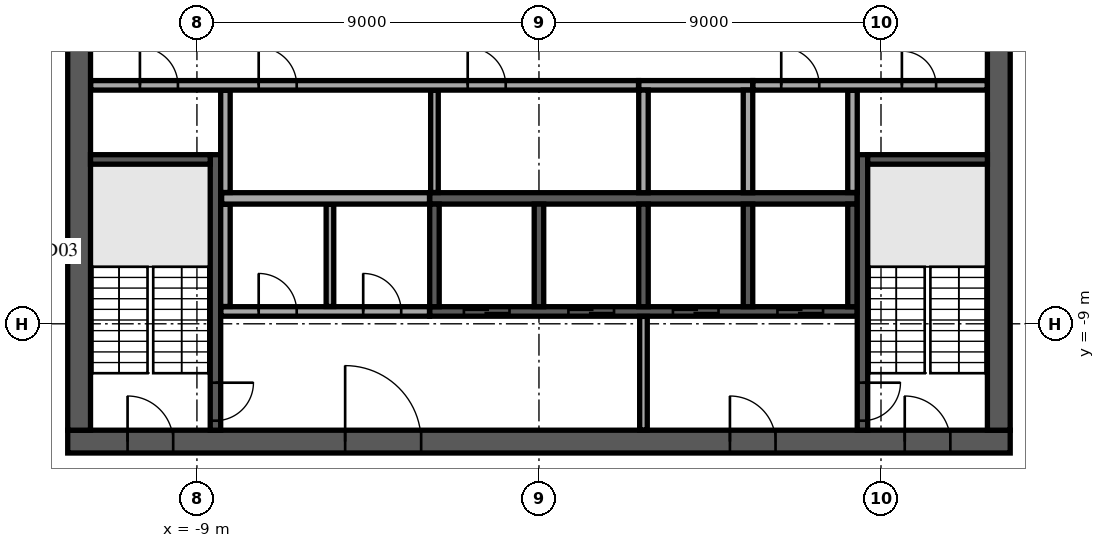
"""IFC4 building model, lengths in metres.
Left out: names, types, materials, properties, quantities, classifications, styles, units other than length and angle.
Written with IfcOpenShell. Run it as: python <this file> out.ifc"""

import sys

from ifc_helpers import new_model, si_unit, direction, frame, frame_2d, origin, place, context, subcontext, project, spatial, rectangle, extrude, element, fill, save


model = new_model("IFC4")
c1 = context("Model", 3, precision=1e-05, world=origin(), true_north=direction((0.0, 1.0)))
c2 = subcontext(c1, "Body", "Model", "MODEL_VIEW")
j1 = project(units=[si_unit("LENGTHUNIT", "METRE"), si_unit("PLANEANGLEUNIT", "RADIAN")], contexts=[c1])
p1 = place(None, origin())
s1 = spatial("IfcSite", under=j1, at=p1, CompositionType="ELEMENT")
p2 = place(p1, origin())
s2 = spatial("IfcBuilding", under=s1, at=p2, CompositionType="ELEMENT")
p3 = place(p2, frame((0.0, 0.0, 324.5)))
s3 = spatial("IfcBuildingStorey", under=s2, at=p3, CompositionType="ELEMENT", Elevation=324.5)
p4 = place(p3, frame((-12.4, -12.1, 0.0), z_axis=(0.0, 0.0, 1.0), x_axis=(1.0, 0.0, 0.0)))
e1 = element("IfcWall", 1, at=p4, inside=s3, PredefinedType="SHEAR", context=c2, shape_type="SweptSolid", body=[
    extrude(rectangle(XDim=24.8, YDim=0.6, at=frame_2d((12.4, 0.0))), origin(), (0.0, 0.0, 1.0), 3.65),
])
p5 = place(p4, frame((7.3, 0.0, 0.0)))
e2 = element("IfcOpeningElement", 2, at=p5, cuts=e1, PredefinedType="OPENING", context=c2, shape_type="SweptSolid", body=[
    extrude(rectangle(XDim=2.0, YDim=2.1, at=frame_2d((1.0, 1.05))), frame((0.0, 0.31, 0.0), z_axis=(0.0, -1.0, 0.0), x_axis=(1.0, 0.0, 0.0)), (0.0, 0.0, 1.0), 0.62),
])
p6 = place(p4, frame((17.425, 0.0, 0.0)))
e3 = element("IfcOpeningElement", 3, at=p6, cuts=e1, PredefinedType="OPENING", context=c2, shape_type="SweptSolid", body=[
    extrude(rectangle(XDim=1.2, YDim=2.1, at=frame_2d((0.6, 1.05))), frame((0.0, 0.31, 0.0), z_axis=(0.0, -1.0, 0.0), x_axis=(1.0, 0.0, 0.0)), (0.0, 0.0, 1.0), 0.62),
])
p7 = place(p4, frame((1.575, 0.0, 0.0)))
e4 = element("IfcOpeningElement", 4, at=p7, cuts=e1, PredefinedType="OPENING", context=c2, shape_type="SweptSolid", body=[
    extrude(rectangle(XDim=1.2, YDim=2.1, at=frame_2d((0.6, 1.05))), frame((0.0, 0.31, 0.0), z_axis=(0.0, -1.0, 0.0), x_axis=(1.0, 0.0, 0.0)), (0.0, 0.0, 1.0), 0.62),
])
p8 = place(p4, frame((22.025, 0.0, 0.0)))
e5 = element("IfcOpeningElement", 5, at=p8, cuts=e1, PredefinedType="OPENING", context=c2, shape_type="SweptSolid", body=[
    extrude(rectangle(XDim=1.2, YDim=2.1, at=frame_2d((0.6, 1.05))), frame((0.0, 0.31, 0.0), z_axis=(0.0, -1.0, 0.0), x_axis=(1.0, 0.0, 0.0)), (0.0, 0.0, 1.0), 0.62),
])
p9 = place(p3, frame((12.1, -11.8, 0.0), z_axis=(0.0, 0.0, 1.0), x_axis=(0.0, 1.0, 0.0)))
e6 = element("IfcWall", 6, at=p9, inside=s3, PredefinedType="SHEAR", context=c2, shape_type="SweptSolid", body=[
    extrude(rectangle(XDim=23.6, YDim=0.6, at=frame_2d((11.8, 0.0))), origin(), (0.0, 0.0, 1.0), 3.65),
])
p10 = place(p9, frame((10.6, 0.0, 0.0)))
e7 = element("IfcOpeningElement", 7, at=p10, cuts=e6, PredefinedType="OPENING", context=c2, shape_type="SweptSolid", body=[
    extrude(rectangle(XDim=2.4, YDim=2.4, at=frame_2d((1.2, 1.2))), frame((0.0, 0.31, 0.0), z_axis=(0.0, -1.0, 0.0), x_axis=(1.0, 0.0, 0.0)), (0.0, 0.0, 1.0), 0.62),
])
p11 = place(p3, frame((-12.1, -11.8, 0.0), z_axis=(0.0, 0.0, 1.0), x_axis=(0.0, 1.0, 0.0)))
e8 = element("IfcWall", 8, at=p11, inside=s3, PredefinedType="SHEAR", context=c2, shape_type="SweptSolid", body=[
    extrude(rectangle(XDim=23.6, YDim=0.6, at=frame_2d((11.8, 0.0))), origin(), (0.0, 0.0, 1.0), 3.65),
])
p12 = place(p11, frame((10.6, 0.0, 0.0)))
e9 = element("IfcOpeningElement", 9, at=p12, cuts=e8, PredefinedType="OPENING", context=c2, shape_type="SweptSolid", body=[
    extrude(rectangle(XDim=2.4, YDim=2.4, at=frame_2d((1.2, 1.2))), frame((0.0, 0.31, 0.0), z_axis=(0.0, -1.0, 0.0), x_axis=(1.0, 0.0, 0.0)), (0.0, 0.0, 1.0), 0.62),
])
p13 = place(p3, frame((-2.875, -5.7, 0.0), z_axis=(0.0, 0.0, 1.0), x_axis=(1.0, 0.0, 0.0)))
e10 = element("IfcWall", 10, at=p13, inside=s3, PredefinedType="SOLIDWALL", context=c2, shape_type="SweptSolid", body=[
    extrude(rectangle(XDim=11.25, YDim=0.3, at=frame_2d((5.625, 0.0))), origin(), (0.0, 0.0, 1.0), 3.65),
])
p14 = place(p3, frame((2.625, -2.725, 0.0), z_axis=(0.0, 0.0, 1.0), x_axis=(1.0, 0.0, 0.0)))
e11 = element("IfcWall", 11, at=p14, inside=s3, PredefinedType="SOLIDWALL", context=c2, shape_type="SweptSolid", body=[
    extrude(rectangle(XDim=3.0, YDim=0.25, at=frame_2d((1.5, 0.0))), origin(), (0.0, 0.0, 1.0), 3.65),
])
for number, where, z_axis, x_axis in (
    (12, (2.75, -5.55, 0.0), (0.0, 0.0, 1.0), (0.0, 1.0, 0.0)),
    (13, (5.5, -5.55, 0.0), (0.0, 0.0, 1.0), (0.0, 1.0, 0.0)),
):
    element("IfcWall", number, at=place(p3, frame(where, z_axis=z_axis, x_axis=x_axis)), inside=s3, PredefinedType="SOLIDWALL", context=c2, shape_type="SweptSolid", body=[
        extrude(rectangle(XDim=2.7, YDim=0.25, at=frame_2d((1.35, 0.0))), origin(), (0.0, 0.0, 1.0), 3.65),
    ])
p15 = place(p3, frame((-2.875, -8.675, 0.0), z_axis=(0.0, 0.0, 1.0), x_axis=(1.0, 0.0, 0.0)))
e14 = element("IfcWall", 14, at=p15, inside=s3, PredefinedType="SOLIDWALL", context=c2, shape_type="SweptSolid", body=[
    extrude(rectangle(XDim=11.25, YDim=0.25, at=frame_2d((5.625, 0.0))), origin(), (0.0, 0.0, 1.0), 3.65),
])
p16 = place(p15, frame((0.9, 0.0, 0.0)))
e15 = element("IfcOpeningElement", 15, at=p16, cuts=e14, PredefinedType="OPENING", context=c2, shape_type="SweptSolid", body=[
    extrude(rectangle(XDim=1.2, YDim=2.1, at=frame_2d((0.6, 1.05))), frame((0.0, 0.135, 0.0), z_axis=(0.0, -1.0, 0.0), x_axis=(1.0, 0.0, 0.0)), (0.0, 0.0, 1.0), 0.27),
])
p17 = place(p15, frame((3.65, 0.0, 0.0)))
e16 = element("IfcOpeningElement", 16, at=p17, cuts=e14, PredefinedType="OPENING", context=c2, shape_type="SweptSolid", body=[
    extrude(rectangle(XDim=1.2, YDim=2.1, at=frame_2d((0.6, 1.05))), frame((0.0, 0.135, 0.0), z_axis=(0.0, -1.0, 0.0), x_axis=(1.0, 0.0, 0.0)), (0.0, 0.0, 1.0), 0.27),
])
p18 = place(p15, frame((6.4, 0.0, 0.0)))
e17 = element("IfcOpeningElement", 17, at=p18, cuts=e14, PredefinedType="OPENING", context=c2, shape_type="SweptSolid", body=[
    extrude(rectangle(XDim=1.2, YDim=2.1, at=frame_2d((0.6, 1.05))), frame((0.0, 0.135, 0.0), z_axis=(0.0, -1.0, 0.0), x_axis=(1.0, 0.0, 0.0)), (0.0, 0.0, 1.0), 0.27),
])
p19 = place(p15, frame((9.15, 0.0, 0.0)))
e18 = element("IfcOpeningElement", 18, at=p19, cuts=e14, PredefinedType="OPENING", context=c2, shape_type="SweptSolid", body=[
    extrude(rectangle(XDim=1.2, YDim=2.1, at=frame_2d((0.6, 1.05))), frame((0.0, 0.135, 0.0), z_axis=(0.0, -1.0, 0.0), x_axis=(1.0, 0.0, 0.0)), (0.0, 0.0, 1.0), 0.27),
])
for number, where, z_axis, x_axis in (
    (19, (-2.75, -8.55, 0.0), (0.0, 0.0, 1.0), (0.0, 1.0, 0.0)),
    (20, (0.0, -8.55, 0.0), (0.0, 0.0, 1.0), (0.0, 1.0, 0.0)),
    (21, (2.75, -8.55, 0.0), (0.0, 0.0, 1.0), (0.0, 1.0, 0.0)),
    (22, (5.5, -8.55, 0.0), (0.0, 0.0, 1.0), (0.0, 1.0, 0.0)),
    (23, (8.25, -8.55, 0.0), (0.0, 0.0, 1.0), (0.0, 1.0, 0.0)),
):
    element("IfcWall", number, at=place(p3, frame(where, z_axis=z_axis, x_axis=x_axis)), inside=s3, PredefinedType="SOLIDWALL", context=c2, shape_type="SweptSolid", body=[
        extrude(rectangle(XDim=2.7, YDim=0.25, at=frame_2d((1.35, 0.0))), origin(), (0.0, 0.0, 1.0), 3.65),
    ])
p20 = place(p3, frame((-8.512, -4.55, 0.0), z_axis=(0.0, 0.0, 1.0), x_axis=(0.0, -1.0, 0.0)))
e24 = element("IfcWall", 24, at=p20, inside=s3, PredefinedType="SOLIDWALL", context=c2, shape_type="SweptSolid", body=[
    extrude(rectangle(XDim=7.25, YDim=0.275, at=frame_2d((3.625, 0.0))), origin(), (0.0, 0.0, 1.0), 3.65),
])
p21 = place(p20, frame((6.0, 0.0, 0.0)))
e25 = element("IfcOpeningElement", 25, at=p21, cuts=e24, PredefinedType="OPENING", context=c2, shape_type="SweptSolid", body=[
    extrude(rectangle(XDim=1.0, YDim=2.1, at=frame_2d((0.5, 1.05))), frame((0.0, 0.147, 0.0), z_axis=(0.0, -1.0, 0.0), x_axis=(1.0, 0.0, 0.0)), (0.0, 0.0, 1.0), 0.295),
])
p22 = place(p3, frame((-8.65, -4.675, 0.0), z_axis=(0.0, 0.0, 1.0), x_axis=(-1.0, 0.0, 0.0)))
e26 = element("IfcWall", 26, at=p22, inside=s3, PredefinedType="SOLIDWALL", context=c2, shape_type="SweptSolid", body=[
    extrude(rectangle(XDim=3.15, YDim=0.25, at=frame_2d((1.575, 0.0))), origin(), (0.0, 0.0, 1.0), 3.65),
])
p23 = place(p3, frame((8.512, -4.55, 0.0), z_axis=(0.0, 0.0, 1.0), x_axis=(0.0, -1.0, 0.0)))
e27 = element("IfcWall", 27, at=p23, inside=s3, PredefinedType="SOLIDWALL", context=c2, shape_type="SweptSolid", body=[
    extrude(rectangle(XDim=7.25, YDim=0.275, at=frame_2d((3.625, 0.0))), origin(), (0.0, 0.0, 1.0), 3.65),
])
p24 = place(p23, frame((6.0, 0.0, 0.0)))
e28 = element("IfcOpeningElement", 28, at=p24, cuts=e27, PredefinedType="OPENING", context=c2, shape_type="SweptSolid", body=[
    extrude(rectangle(XDim=1.0, YDim=2.1, at=frame_2d((0.5, 1.05))), frame((0.0, 0.147, 0.0), z_axis=(0.0, -1.0, 0.0), x_axis=(1.0, 0.0, 0.0)), (0.0, 0.0, 1.0), 0.295),
])
p25 = place(p3, frame((8.65, -4.675, 0.0), z_axis=(0.0, 0.0, 1.0), x_axis=(1.0, 0.0, 0.0)))
e29 = element("IfcWall", 29, at=p25, inside=s3, PredefinedType="SOLIDWALL", context=c2, shape_type="SweptSolid", body=[
    extrude(rectangle(XDim=3.15, YDim=0.25, at=frame_2d((1.575, 0.0))), origin(), (0.0, 0.0, 1.0), 3.65),
])
p26 = place(p3, frame((2.75, -11.795, 0.0), z_axis=(0.0, 0.0, 1.0), x_axis=(0.0, 1.0, 0.0)))
e30 = element("IfcWall", 30, at=p26, inside=s3, PredefinedType="PARTITIONING", context=c2, shape_type="SweptSolid", body=[
    extrude(rectangle(XDim=2.99, YDim=0.2, at=frame_2d((1.495, 0.0))), origin(), (0.0, 0.0, 1.0), 3.65),
])
p27 = place(p3, frame((-8.37, -8.675, 0.0), z_axis=(0.0, 0.0, 1.0), x_axis=(1.0, 0.0, 0.0)))
e31 = element("IfcWall", 31, at=p27, inside=s3, PredefinedType="PARTITIONING", context=c2, shape_type="SweptSolid", body=[
    extrude(rectangle(XDim=5.49, YDim=0.25, at=frame_2d((2.745, 0.0))), origin(), (0.0, 0.0, 1.0), 3.65),
])
p28 = place(p27, frame((0.995, 0.0, 0.0)))
e32 = element("IfcOpeningElement", 32, at=p28, cuts=e31, PredefinedType="OPENING", context=c2, shape_type="SweptSolid", body=[
    extrude(rectangle(XDim=1.0, YDim=2.1, at=frame_2d((0.5, 1.05))), frame((0.0, 0.135, 0.0), z_axis=(0.0, -1.0, 0.0), x_axis=(1.0, 0.0, 0.0)), (0.0, 0.0, 1.0), 0.27),
])
p29 = place(p27, frame((3.745, 0.0, 0.0)))
e33 = element("IfcOpeningElement", 33, at=p29, cuts=e31, PredefinedType="OPENING", context=c2, shape_type="SweptSolid", body=[
    extrude(rectangle(XDim=1.0, YDim=2.1, at=frame_2d((0.5, 1.05))), frame((0.0, 0.135, 0.0), z_axis=(0.0, -1.0, 0.0), x_axis=(1.0, 0.0, 0.0)), (0.0, 0.0, 1.0), 0.27),
])
p30 = place(p3, frame((-8.25, -8.545, 0.0), z_axis=(0.0, 0.0, 1.0), x_axis=(0.0, 1.0, 0.0)))
e34 = element("IfcWall", 34, at=p30, inside=s3, PredefinedType="PARTITIONING", context=c2, shape_type="SweptSolid", body=[
    extrude(rectangle(XDim=2.69, YDim=0.25, at=frame_2d((1.345, 0.0))), origin(), (0.0, 0.0, 1.0), 3.65),
])
p31 = place(p3, frame((-5.5, -8.545, 0.0), z_axis=(0.0, 0.0, 1.0), x_axis=(0.0, 1.0, 0.0)))
e35 = element("IfcWall", 35, at=p31, inside=s3, PredefinedType="PARTITIONING", context=c2, shape_type="SweptSolid", body=[
    extrude(rectangle(XDim=2.69, YDim=0.2, at=frame_2d((1.345, 0.0))), origin(), (0.0, 0.0, 1.0), 3.65),
])
p32 = place(p3, frame((-8.35, -5.7, 0.0), z_axis=(0.0, 0.0, 1.0), x_axis=(1.0, 0.0, 0.0)))
e36 = element("IfcWall", 36, at=p32, inside=s3, PredefinedType="PARTITIONING", context=c2, shape_type="SweptSolid", body=[
    extrude(rectangle(XDim=5.47, YDim=0.3, at=frame_2d((2.735, 0.0))), origin(), (0.0, 0.0, 1.0), 3.65),
])
p33 = place(p3, frame((-8.25, -5.545, 0.0), z_axis=(0.0, 0.0, 1.0), x_axis=(0.0, 1.0, 0.0)))
e37 = element("IfcWall", 37, at=p33, inside=s3, PredefinedType="PARTITIONING", context=c2, shape_type="SweptSolid", body=[
    extrude(rectangle(XDim=2.69, YDim=0.25, at=frame_2d((1.345, 0.0))), origin(), (0.0, 0.0, 1.0), 3.65),
])
p34 = place(p3, frame((-2.75, -5.545, 0.0), z_axis=(0.0, 0.0, 1.0), x_axis=(0.0, 1.0, 0.0)))
e38 = element("IfcWall", 38, at=p34, inside=s3, PredefinedType="PARTITIONING", context=c2, shape_type="SweptSolid", body=[
    extrude(rectangle(XDim=2.69, YDim=0.2, at=frame_2d((1.345, 0.0))), origin(), (0.0, 0.0, 1.0), 3.65),
])
p35 = place(p3, frame((8.25, -5.545, 0.0), z_axis=(0.0, 0.0, 1.0), x_axis=(0.0, 1.0, 0.0)))
e39 = element("IfcWall", 39, at=p35, inside=s3, PredefinedType="PARTITIONING", context=c2, shape_type="SweptSolid", body=[
    extrude(rectangle(XDim=2.69, YDim=0.25, at=frame_2d((1.345, 0.0))), origin(), (0.0, 0.0, 1.0), 3.65),
])
p36 = place(p3, frame((-11.795, -2.725, 0.0), z_axis=(0.0, 0.0, 1.0), x_axis=(1.0, 0.0, 0.0)))
e40 = element("IfcWall", 40, at=p36, inside=s3, PredefinedType="PARTITIONING", context=c2, shape_type="SweptSolid", body=[
    extrude(rectangle(XDim=14.415, YDim=0.25, at=frame_2d((7.208, 0.0))), origin(), (0.0, 0.0, 1.0), 3.65),
])
p37 = place(p36, frame((1.295, 0.0, 0.0)))
e41 = element("IfcOpeningElement", 41, at=p37, cuts=e40, PredefinedType="OPENING", context=c2, shape_type="SweptSolid", body=[
    extrude(rectangle(XDim=1.0, YDim=2.1, at=frame_2d((0.5, 1.05))), frame((0.0, 0.135, 0.0), z_axis=(0.0, -1.0, 0.0), x_axis=(1.0, 0.0, 0.0)), (0.0, 0.0, 1.0), 0.27),
])
p38 = place(p36, frame((4.42, 0.0, 0.0)))
e42 = element("IfcOpeningElement", 42, at=p38, cuts=e40, PredefinedType="OPENING", context=c2, shape_type="SweptSolid", body=[
    extrude(rectangle(XDim=1.0, YDim=2.1, at=frame_2d((0.5, 1.05))), frame((0.0, 0.135, 0.0), z_axis=(0.0, -1.0, 0.0), x_axis=(1.0, 0.0, 0.0)), (0.0, 0.0, 1.0), 0.27),
])
p39 = place(p36, frame((9.92, 0.0, 0.0)))
e43 = element("IfcOpeningElement", 43, at=p39, cuts=e40, PredefinedType="OPENING", context=c2, shape_type="SweptSolid", body=[
    extrude(rectangle(XDim=1.0, YDim=2.1, at=frame_2d((0.5, 1.05))), frame((0.0, 0.135, 0.0), z_axis=(0.0, -1.0, 0.0), x_axis=(1.0, 0.0, 0.0)), (0.0, 0.0, 1.0), 0.27),
])
p40 = place(p3, frame((5.63, -2.725, 0.0), z_axis=(0.0, 0.0, 1.0), x_axis=(1.0, 0.0, 0.0)))
e44 = element("IfcWall", 44, at=p40, inside=s3, PredefinedType="PARTITIONING", context=c2, shape_type="SweptSolid", body=[
    extrude(rectangle(XDim=6.165, YDim=0.25, at=frame_2d((3.083, 0.0))), origin(), (0.0, 0.0, 1.0), 3.65),
])
p41 = place(p40, frame((0.745, 0.0, 0.0)))
e45 = element("IfcOpeningElement", 45, at=p41, cuts=e44, PredefinedType="OPENING", context=c2, shape_type="SweptSolid", body=[
    extrude(rectangle(XDim=1.0, YDim=2.1, at=frame_2d((0.5, 1.05))), frame((0.0, 0.135, 0.0), z_axis=(0.0, -1.0, 0.0), x_axis=(1.0, 0.0, 0.0)), (0.0, 0.0, 1.0), 0.27),
])
p42 = place(p40, frame((3.92, 0.0, 0.0)))
e46 = element("IfcOpeningElement", 46, at=p42, cuts=e44, PredefinedType="OPENING", context=c2, shape_type="SweptSolid", body=[
    extrude(rectangle(XDim=0.9, YDim=2.1, at=frame_2d((0.45, 1.05))), frame((0.0, 0.135, 0.0), z_axis=(0.0, -1.0, 0.0), x_axis=(1.0, 0.0, 0.0)), (0.0, 0.0, 1.0), 0.27),
])
p43 = place(p5, origin())
e47 = element("IfcDoor", 47, at=p43, inside=s3, OperationType="SINGLE_SWING_LEFT", PredefinedType="DOOR", context=c2, shape_type="SweptSolid", body=[
    extrude(rectangle(XDim=2.0, YDim=2.1, at=frame_2d((1.0, 1.05))), frame((0.0, 0.025, 0.0), z_axis=(0.0, -1.0, 0.0), x_axis=(1.0, 0.0, 0.0)), (0.0, 0.0, 1.0), 0.05),
])
fill(e2, e47)
p44 = place(p6, origin())
e48 = element("IfcDoor", 48, at=p44, inside=s3, OperationType="SINGLE_SWING_LEFT", PredefinedType="DOOR", context=c2, shape_type="SweptSolid", body=[
    extrude(rectangle(XDim=1.2, YDim=2.1, at=frame_2d((0.6, 1.05))), frame((0.0, 0.025, 0.0), z_axis=(0.0, -1.0, 0.0), x_axis=(1.0, 0.0, 0.0)), (0.0, 0.0, 1.0), 0.05),
])
fill(e3, e48)
p45 = place(p7, origin())
e49 = element("IfcDoor", 49, at=p45, inside=s3, OperationType="SINGLE_SWING_LEFT", PredefinedType="DOOR", context=c2, shape_type="SweptSolid", body=[
    extrude(rectangle(XDim=1.2, YDim=2.1, at=frame_2d((0.6, 1.05))), frame((0.0, 0.025, 0.0), z_axis=(0.0, -1.0, 0.0), x_axis=(1.0, 0.0, 0.0)), (0.0, 0.0, 1.0), 0.05),
])
fill(e4, e49)
p46 = place(p8, origin())
e50 = element("IfcDoor", 50, at=p46, inside=s3, OperationType="SINGLE_SWING_LEFT", PredefinedType="DOOR", context=c2, shape_type="SweptSolid", body=[
    extrude(rectangle(XDim=1.2, YDim=2.1, at=frame_2d((0.6, 1.05))), frame((0.0, 0.025, 0.0), z_axis=(0.0, -1.0, 0.0), x_axis=(1.0, 0.0, 0.0)), (0.0, 0.0, 1.0), 0.05),
])
fill(e5, e50)
p47 = place(p16, origin())
e51 = element("IfcDoor", 51, at=p47, inside=s3, OperationType="DOUBLE_DOOR_SLIDING", PredefinedType="DOOR", context=c2, shape_type="SweptSolid", body=[
    extrude(rectangle(XDim=1.2, YDim=2.1, at=frame_2d((0.6, 1.05))), frame((0.0, 0.025, 0.0), z_axis=(0.0, -1.0, 0.0), x_axis=(1.0, 0.0, 0.0)), (0.0, 0.0, 1.0), 0.05),
])
fill(e15, e51)
p48 = place(p17, origin())
e52 = element("IfcDoor", 52, at=p48, inside=s3, OperationType="DOUBLE_DOOR_SLIDING", PredefinedType="DOOR", context=c2, shape_type="SweptSolid", body=[
    extrude(rectangle(XDim=1.2, YDim=2.1, at=frame_2d((0.6, 1.05))), frame((0.0, 0.025, 0.0), z_axis=(0.0, -1.0, 0.0), x_axis=(1.0, 0.0, 0.0)), (0.0, 0.0, 1.0), 0.05),
])
fill(e16, e52)
p49 = place(p18, origin())
e53 = element("IfcDoor", 53, at=p49, inside=s3, OperationType="DOUBLE_DOOR_SLIDING", PredefinedType="DOOR", context=c2, shape_type="SweptSolid", body=[
    extrude(rectangle(XDim=1.2, YDim=2.1, at=frame_2d((0.6, 1.05))), frame((0.0, 0.025, 0.0), z_axis=(0.0, -1.0, 0.0), x_axis=(1.0, 0.0, 0.0)), (0.0, 0.0, 1.0), 0.05),
])
fill(e17, e53)
p50 = place(p19, origin())
e54 = element("IfcDoor", 54, at=p50, inside=s3, OperationType="DOUBLE_DOOR_SLIDING", PredefinedType="DOOR", context=c2, shape_type="SweptSolid", body=[
    extrude(rectangle(XDim=1.2, YDim=2.1, at=frame_2d((0.6, 1.05))), frame((0.0, 0.025, 0.0), z_axis=(0.0, -1.0, 0.0), x_axis=(1.0, 0.0, 0.0)), (0.0, 0.0, 1.0), 0.05),
])
fill(e18, e54)
p51 = place(p21, origin())
e55 = element("IfcDoor", 55, at=p51, inside=s3, OperationType="SINGLE_SWING_LEFT", PredefinedType="DOOR", context=c2, shape_type="SweptSolid", body=[
    extrude(rectangle(XDim=1.0, YDim=2.1, at=frame_2d((0.5, 1.05))), frame((0.0, 0.025, 0.0), z_axis=(0.0, -1.0, 0.0), x_axis=(1.0, 0.0, 0.0)), (0.0, 0.0, 1.0), 0.05),
])
fill(e25, e55)
p52 = place(p24, origin())
e56 = element("IfcDoor", 56, at=p52, inside=s3, OperationType="SINGLE_SWING_LEFT", PredefinedType="DOOR", context=c2, shape_type="SweptSolid", body=[
    extrude(rectangle(XDim=1.0, YDim=2.1, at=frame_2d((0.5, 1.05))), frame((0.0, 0.025, 0.0), z_axis=(0.0, -1.0, 0.0), x_axis=(1.0, 0.0, 0.0)), (0.0, 0.0, 1.0), 0.05),
])
fill(e28, e56)
p53 = place(p28, origin())
e57 = element("IfcDoor", 57, at=p53, inside=s3, OperationType="SINGLE_SWING_RIGHT", PredefinedType="DOOR", context=c2, shape_type="SweptSolid", body=[
    extrude(rectangle(XDim=1.0, YDim=2.1, at=frame_2d((0.5, 1.05))), frame((0.0, 0.025, 0.0), z_axis=(0.0, -1.0, 0.0), x_axis=(1.0, 0.0, 0.0)), (0.0, 0.0, 1.0), 0.05),
])
fill(e32, e57)
p54 = place(p29, origin())
e58 = element("IfcDoor", 58, at=p54, inside=s3, OperationType="SINGLE_SWING_RIGHT", PredefinedType="DOOR", context=c2, shape_type="SweptSolid", body=[
    extrude(rectangle(XDim=1.0, YDim=2.1, at=frame_2d((0.5, 1.05))), frame((0.0, 0.025, 0.0), z_axis=(0.0, -1.0, 0.0), x_axis=(1.0, 0.0, 0.0)), (0.0, 0.0, 1.0), 0.05),
])
fill(e33, e58)
p55 = place(p37, origin())
e59 = element("IfcDoor", 59, at=p55, inside=s3, OperationType="SINGLE_SWING_RIGHT", PredefinedType="DOOR", context=c2, shape_type="SweptSolid", body=[
    extrude(rectangle(XDim=1.0, YDim=2.1, at=frame_2d((0.5, 1.05))), frame((0.0, 0.025, 0.0), z_axis=(0.0, -1.0, 0.0), x_axis=(1.0, 0.0, 0.0)), (0.0, 0.0, 1.0), 0.05),
])
fill(e41, e59)
p56 = place(p41, origin())
e60 = element("IfcDoor", 60, at=p56, inside=s3, OperationType="SINGLE_SWING_RIGHT", PredefinedType="DOOR", context=c2, shape_type="SweptSolid", body=[
    extrude(rectangle(XDim=1.0, YDim=2.1, at=frame_2d((0.5, 1.05))), frame((0.0, 0.025, 0.0), z_axis=(0.0, -1.0, 0.0), x_axis=(1.0, 0.0, 0.0)), (0.0, 0.0, 1.0), 0.05),
])
fill(e45, e60)
p57 = place(p42, origin())
e61 = element("IfcDoor", 61, at=p57, inside=s3, OperationType="SINGLE_SWING_RIGHT", PredefinedType="DOOR", context=c2, shape_type="SweptSolid", body=[
    extrude(rectangle(XDim=0.9, YDim=2.1, at=frame_2d((0.45, 1.05))), frame((0.0, 0.025, 0.0), z_axis=(0.0, -1.0, 0.0), x_axis=(1.0, 0.0, 0.0)), (0.0, 0.0, 1.0), 0.05),
])
fill(e46, e61)
p58 = place(p38, origin())
e62 = element("IfcDoor", 62, at=p58, inside=s3, OperationType="SINGLE_SWING_RIGHT", PredefinedType="DOOR", context=c2, shape_type="SweptSolid", body=[
    extrude(rectangle(XDim=1.0, YDim=2.1, at=frame_2d((0.5, 1.05))), frame((0.0, 0.025, 0.0), z_axis=(0.0, -1.0, 0.0), x_axis=(1.0, 0.0, 0.0)), (0.0, 0.0, 1.0), 0.05),
])
fill(e42, e62)
p59 = place(p39, origin())
e63 = element("IfcDoor", 63, at=p59, inside=s3, OperationType="SINGLE_SWING_RIGHT", PredefinedType="DOOR", context=c2, shape_type="SweptSolid", body=[
    extrude(rectangle(XDim=1.0, YDim=2.1, at=frame_2d((0.5, 1.05))), frame((0.0, 0.025, 0.0), z_axis=(0.0, -1.0, 0.0), x_axis=(1.0, 0.0, 0.0)), (0.0, 0.0, 1.0), 0.05),
])
fill(e43, e63)
save(model, sys.argv[1])
